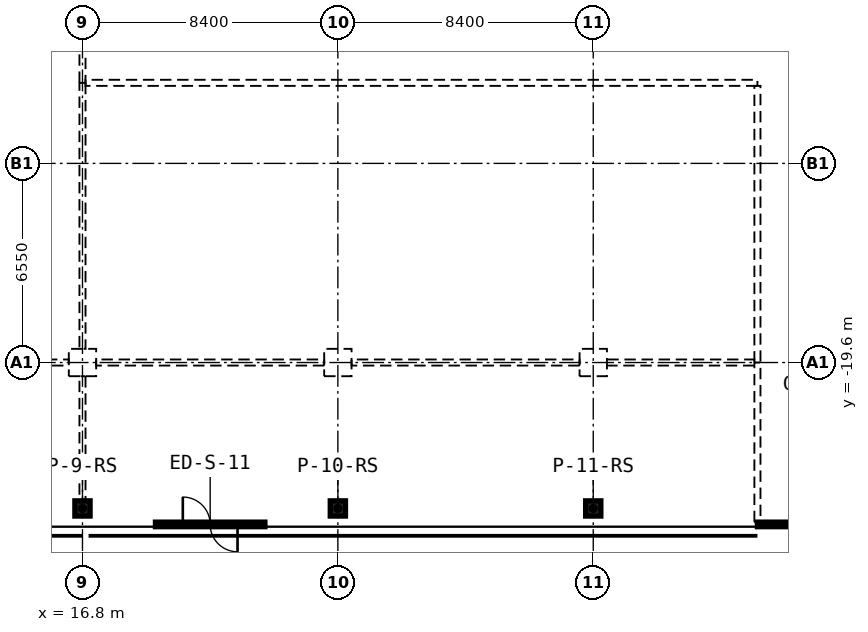
"""IFC4 building model, lengths in metres.
Left out: names, types, materials, properties, quantities, classifications, styles, units other than length and angle.
Written with IfcOpenShell. Run it as: python <this file> out.ifc"""

import sys

from ifc_helpers import new_model, si_unit, direction, frame, frame_2d, origin, origin_2d, place, context, subcontext, project, spatial, rectangle, hollow_rectangle, extrude, element, fill, save


model = new_model("IFC4")
c1 = context("Model", 3, precision=1e-05, world=origin(), true_north=direction((0.0, 1.0)))
c2 = subcontext(c1, "Body", "Model", "MODEL_VIEW")
j1 = project(units=[si_unit("LENGTHUNIT", "METRE"), si_unit("PLANEANGLEUNIT", "RADIAN")], contexts=[c1])
p1 = place(None, origin())
s1 = spatial("IfcSite", under=j1, at=p1, CompositionType="ELEMENT")
p2 = place(p1, origin())
s2 = spatial("IfcBuilding", under=s1, at=p2, CompositionType="ELEMENT")
p3 = place(p2, frame((0.0, 0.0, 9.0)))
s3 = spatial("IfcBuildingStorey", under=s2, at=p3, CompositionType="ELEMENT", Elevation=9.0)
for number, where, z_axis, x_axis in (
    (1, (16.8, -19.6, 0.0), (0.0, 0.0, 1.0), (1.0, 0.0, 0.0)),
    (2, (25.2, -19.6, 0.0), (0.0, 0.0, 1.0), (1.0, 0.0, 0.0)),
    (3, (33.6, -19.6, 0.0), (0.0, 0.0, 1.0), (1.0, 0.0, 0.0)),
):
    element("IfcColumn", number, at=place(p3, frame(where, z_axis=z_axis, x_axis=x_axis)), inside=s3, PredefinedType="COLUMN", context=c2, shape_type="SweptSolid", body=[
        extrude(hollow_rectangle(XDim=0.9, YDim=0.9, WallThickness=0.036, at=origin_2d()), origin(), (0.0, 0.0, 1.0), 5.6),
    ])
for number, where, z_axis, x_axis in (
    (4, (16.8, -24.4, 0.0), (0.0, 0.0, 1.0), (1.0, 0.0, 0.0)),
    (5, (25.2, -24.4, 0.0), (0.0, 0.0, 1.0), (1.0, 0.0, 0.0)),
    (6, (33.6, -24.4, 0.0), (0.0, 0.0, 1.0), (1.0, 0.0, 0.0)),
):
    element("IfcColumn", number, at=place(p3, frame(where, z_axis=z_axis, x_axis=x_axis)), inside=s3, PredefinedType="COLUMN", context=c2, shape_type="SweptSolid", body=[
        extrude(hollow_rectangle(XDim=0.5, YDim=0.5, WallThickness=0.019, InnerFilletRadius=0.029, OuterFilletRadius=0.048, at=origin_2d()), origin(), (0.0, 0.0, 1.0), 5.6),
    ])
p4 = place(p3, frame((16.8, -10.4, 0.0), z_axis=(0.0, 0.0, 1.0), x_axis=(0.0, 1.0, 0.0)))
e7 = element("IfcWall", 7, at=p4, inside=s3, PredefinedType="PARTITIONING", context=c2, shape_type="SweptSolid", body=[
    extrude(rectangle(XDim=2.0, YDim=0.2, at=frame_2d((1.0, 0.0))), origin(), (0.0, 0.0, 1.0), 5.6),
])
p5 = place(p3, frame((39.0, -19.6, 0.0), z_axis=(0.0, 0.0, 1.0), x_axis=(0.0, 1.0, 0.0)))
e8 = element("IfcWall", 8, at=p5, inside=s3, PredefinedType="PARTITIONING", context=c2, shape_type="SweptSolid", body=[
    extrude(rectangle(XDim=9.1, YDim=0.2, at=frame_2d((4.55, 0.0))), origin(), (0.0, 0.0, 1.0), 5.6),
])
p6 = place(p3, frame((39.0, -10.4, 0.0), z_axis=(0.0, 0.0, 1.0), x_axis=(-1.0, 0.0, 0.0)))
e9 = element("IfcWall", 9, at=p6, inside=s3, PredefinedType="PARTITIONING", context=c2, shape_type="SweptSolid", body=[
    extrude(rectangle(XDim=22.1, YDim=0.2, at=frame_2d((11.05, 0.0))), origin(), (0.0, 0.0, 1.0), 5.6),
])
p7 = place(p6, frame((8.3, 0.0, 0.0)))
e10 = element("IfcOpeningElement", 10, at=p7, cuts=e9, PredefinedType="OPENING", context=c2, shape_type="SweptSolid", body=[
    extrude(rectangle(XDim=1.4, YDim=2.1, at=frame_2d((0.7, 1.05))), frame((0.0, 0.11, 0.0), z_axis=(0.0, -1.0, 0.0), x_axis=(1.0, 0.0, 0.0)), (0.0, 0.0, 1.0), 0.22),
])
p8 = place(p3, frame((39.0, -24.85, 0.0), z_axis=(0.0, 0.0, 1.0), x_axis=(0.0, 1.0, 0.0)))
e11 = element("IfcWall", 11, at=p8, inside=s3, PredefinedType="PARTITIONING", context=c2, shape_type="SweptSolid", body=[
    extrude(rectangle(XDim=5.25, YDim=0.2, at=frame_2d((2.625, 0.0))), origin(), (0.0, 0.0, 1.0), 5.6),
])
p9 = place(p8, frame((2.25, 0.0, 0.0)))
e12 = element("IfcOpeningElement", 12, at=p9, cuts=e11, PredefinedType="OPENING", context=c2, shape_type="SweptSolid", body=[
    extrude(rectangle(XDim=1.2, YDim=2.1, at=frame_2d((0.6, 1.05))), frame((0.0, 0.11, 0.0), z_axis=(0.0, -1.0, 0.0), x_axis=(1.0, 0.0, 0.0)), (0.0, 0.0, 1.0), 0.22),
])
p10 = place(p3, frame((8.85, -19.6, 0.0), z_axis=(0.0, 0.0, 1.0), x_axis=(1.0, 0.0, 0.0)))
e13 = element("IfcWall", 13, at=p10, inside=s3, PredefinedType="PARTITIONING", context=c2, shape_type="SweptSolid", body=[
    extrude(rectangle(XDim=7.5, YDim=0.2, at=frame_2d((3.75, 0.0))), origin(), (0.0, 0.0, 1.0), 5.6),
])
p11 = place(p10, frame((2.25, 0.0, 0.0)))
e14 = element("IfcOpeningElement", 14, at=p11, cuts=e13, PredefinedType="OPENING", context=c2, shape_type="SweptSolid", body=[
    extrude(rectangle(XDim=3.0, YDim=2.1, at=frame_2d((1.5, 1.05))), frame((0.0, 0.11, 0.0), z_axis=(0.0, -1.0, 0.0), x_axis=(1.0, 0.0, 0.0)), (0.0, 0.0, 1.0), 0.22),
])
p12 = place(p3, frame((16.8, -20.05, 0.0), z_axis=(0.0, 0.0, 1.0), x_axis=(0.0, -1.0, 0.0)))
e15 = element("IfcWall", 15, at=p12, inside=s3, PredefinedType="PARTITIONING", context=c2, shape_type="SweptSolid", body=[
    extrude(rectangle(XDim=4.1, YDim=0.2, at=frame_2d((2.05, 0.0))), origin(), (0.0, 0.0, 1.0), 5.6),
])
p13 = place(p3, frame((16.8, -10.4, 0.0), z_axis=(0.0, 0.0, 1.0), x_axis=(0.0, -1.0, 0.0)))
e16 = element("IfcWall", 16, at=p13, inside=s3, PredefinedType="PARTITIONING", context=c2, shape_type="SweptSolid", body=[
    extrude(rectangle(XDim=8.75, YDim=0.2, at=frame_2d((4.375, 0.0))), origin(), (0.0, 0.0, 1.0), 5.6),
])
p14 = place(p13, frame((4.9, 0.0, 0.0)))
e17 = element("IfcOpeningElement", 17, at=p14, cuts=e16, PredefinedType="OPENING", context=c2, shape_type="SweptSolid", body=[
    extrude(rectangle(XDim=2.0, YDim=2.1, at=frame_2d((1.0, 1.05))), frame((0.0, 0.11, 0.0), z_axis=(0.0, -1.0, 0.0), x_axis=(1.0, 0.0, 0.0)), (0.0, 0.0, 1.0), 0.22),
])
p15 = place(p3, frame((38.9, -19.6, 0.0), z_axis=(0.0, 0.0, 1.0), x_axis=(-1.0, 0.0, 0.0)))
e18 = element("IfcWall", 18, at=p15, inside=s3, PredefinedType="PARTITIONING", context=c2, shape_type="SweptSolid", body=[
    extrude(rectangle(XDim=4.85, YDim=0.2, at=frame_2d((2.425, 0.0))), origin(), (0.0, 0.0, 1.0), 5.6),
])
p16 = place(p3, frame((33.15, -19.6, 0.0), z_axis=(0.0, 0.0, 1.0), x_axis=(-1.0, 0.0, 0.0)))
e19 = element("IfcWall", 19, at=p16, inside=s3, PredefinedType="PARTITIONING", context=c2, shape_type="SweptSolid", body=[
    extrude(rectangle(XDim=7.5, YDim=0.2, at=frame_2d((3.75, 0.0))), origin(), (0.0, 0.0, 1.0), 5.6),
])
p17 = place(p16, frame((2.55, 0.0, 0.0)))
e20 = element("IfcOpeningElement", 20, at=p17, cuts=e19, PredefinedType="OPENING", context=c2, shape_type="SweptSolid", body=[
    extrude(rectangle(XDim=2.4, YDim=2.1, at=frame_2d((1.2, 1.05))), frame((0.0, 0.11, 0.0), z_axis=(0.0, -1.0, 0.0), x_axis=(1.0, 0.0, 0.0)), (0.0, 0.0, 1.0), 0.22),
])
p18 = place(p3, frame((24.75, -19.6, 0.0), z_axis=(0.0, 0.0, 1.0), x_axis=(-1.0, 0.0, 0.0)))
e21 = element("IfcWall", 21, at=p18, inside=s3, PredefinedType="PARTITIONING", context=c2, shape_type="SweptSolid", body=[
    extrude(rectangle(XDim=7.5, YDim=0.2, at=frame_2d((3.75, 0.0))), origin(), (0.0, 0.0, 1.0), 5.6),
])
p19 = place(p18, frame((2.55, 0.0, 0.0)))
e22 = element("IfcOpeningElement", 22, at=p19, cuts=e21, PredefinedType="OPENING", context=c2, shape_type="SweptSolid", body=[
    extrude(rectangle(XDim=2.4, YDim=2.1, at=frame_2d((1.2, 1.05))), frame((0.0, 0.11, 0.0), z_axis=(0.0, -1.0, 0.0), x_axis=(1.0, 0.0, 0.0)), (0.0, 0.0, 1.0), 0.22),
])
p20 = place(p3, frame((51.98, -24.925, 0.0), z_axis=(0.0, 0.0, 1.0), x_axis=(-1.0, 0.0, 0.0)))
e23 = element("IfcWall", 23, at=p20, inside=s3, PredefinedType="STANDARD", context=c2, shape_type="SweptSolid", body=[
    extrude(rectangle(XDim=12.98, YDim=0.15, at=frame_2d((6.49, 0.0))), origin(), (0.0, 0.0, 1.0), 5.6),
])
p21 = place(p3, frame((22.8, -24.925, 0.0), z_axis=(0.0, 0.0, 1.0), x_axis=(-1.0, 0.0, 0.0)))
e24 = element("IfcWall", 24, at=p21, inside=s3, PredefinedType="STANDARD", context=c2, shape_type="SweptSolid", body=[
    extrude(rectangle(XDim=3.6, YDim=0.15, at=frame_2d((1.8, 0.0))), origin(), (0.0, 0.0, 1.0), 5.6),
])
p22 = place(p21, frame((0.9, 0.0, 0.0)))
e25 = element("IfcOpeningElement", 25, at=p22, cuts=e24, PredefinedType="OPENING", context=c2, shape_type="SweptSolid", body=[
    extrude(rectangle(XDim=1.8, YDim=2.1, at=frame_2d((0.9, 1.05))), frame((0.0, 0.085, 0.0), z_axis=(0.0, -1.0, 0.0), x_axis=(1.0, 0.0, 0.0)), (0.0, 0.0, 1.0), 0.17),
])
p23 = place(p14, origin())
e26 = element("IfcDoor", 26, at=p23, inside=s3, OperationType="DOUBLE_DOOR_DOUBLE_SWING", PredefinedType="DOOR", context=c2, shape_type="SweptSolid", body=[
    extrude(rectangle(XDim=2.0, YDim=2.1, at=frame_2d((1.0, 1.05))), frame((0.0, 0.025, 0.0), z_axis=(0.0, -1.0, 0.0), x_axis=(1.0, 0.0, 0.0)), (0.0, 0.0, 1.0), 0.05),
])
fill(e17, e26)
p24 = place(p19, origin())
e27 = element("IfcDoor", 27, at=p24, inside=s3, OperationType="DOUBLE_DOOR_DOUBLE_SWING", PredefinedType="DOOR", context=c2, shape_type="SweptSolid", body=[
    extrude(rectangle(XDim=2.4, YDim=2.1, at=frame_2d((1.2, 1.05))), frame((0.0, 0.025, 0.0), z_axis=(0.0, -1.0, 0.0), x_axis=(1.0, 0.0, 0.0)), (0.0, 0.0, 1.0), 0.05),
])
fill(e22, e27)
p25 = place(p17, origin())
e28 = element("IfcDoor", 28, at=p25, inside=s3, OperationType="DOUBLE_DOOR_DOUBLE_SWING", PredefinedType="DOOR", context=c2, shape_type="SweptSolid", body=[
    extrude(rectangle(XDim=2.4, YDim=2.1, at=frame_2d((1.2, 1.05))), frame((0.0, 0.025, 0.0), z_axis=(0.0, -1.0, 0.0), x_axis=(1.0, 0.0, 0.0)), (0.0, 0.0, 1.0), 0.05),
])
fill(e20, e28)
p26 = place(p7, origin())
e29 = element("IfcDoor", 29, at=p26, inside=s3, OperationType="SINGLE_SWING_LEFT", PredefinedType="DOOR", context=c2, shape_type="SweptSolid", body=[
    extrude(rectangle(XDim=1.4, YDim=2.1, at=frame_2d((0.7, 1.05))), frame((0.0, 0.025, 0.0), z_axis=(0.0, -1.0, 0.0), x_axis=(1.0, 0.0, 0.0)), (0.0, 0.0, 1.0), 0.05),
])
fill(e10, e29)
p27 = place(p9, origin())
e30 = element("IfcDoor", 30, at=p27, inside=s3, OperationType="SINGLE_SWING_RIGHT", PredefinedType="DOOR", context=c2, shape_type="SweptSolid", body=[
    extrude(rectangle(XDim=1.2, YDim=2.1, at=frame_2d((0.6, 1.05))), frame((0.0, 0.025, 0.0), z_axis=(0.0, -1.0, 0.0), x_axis=(1.0, 0.0, 0.0)), (0.0, 0.0, 1.0), 0.05),
])
fill(e12, e30)
p28 = place(p22, origin())
e31 = element("IfcDoor", 31, at=p28, inside=s3, OperationType="DOUBLE_DOOR_DOUBLE_SWING", PredefinedType="DOOR", context=c2, shape_type="SweptSolid", body=[
    extrude(rectangle(XDim=1.8, YDim=2.1, at=frame_2d((0.9, 1.05))), frame((0.0, 0.025, 0.0), z_axis=(0.0, -1.0, 0.0), x_axis=(1.0, 0.0, 0.0)), (0.0, 0.0, 1.0), 0.05),
])
fill(e25, e31)
save(model, sys.argv[1])
